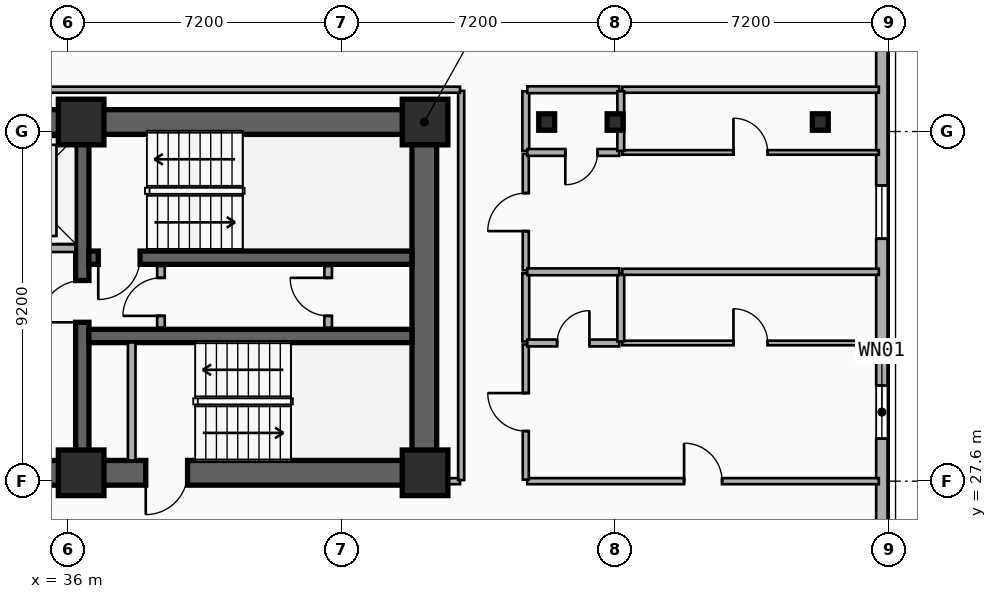
"""IFC4 building model, lengths in metres.
Left out: names, types, materials, properties, quantities, classifications, styles, units other than length and angle.
Written with IfcOpenShell. Run it as: python <this file> out.ifc"""

import sys

from ifc_helpers import new_model, si_unit, direction, frame, frame_2d, origin, origin_2d, place, context, subcontext, project, spatial, rectangle, i_section, extrude, element, fill, save


model = new_model("IFC4")
c1 = context("Model", 3, precision=1e-05, world=origin(), true_north=direction((0.0, 1.0)))
c2 = subcontext(c1, "Body", "Model", "MODEL_VIEW")
j1 = project(units=[si_unit("LENGTHUNIT", "METRE"), si_unit("PLANEANGLEUNIT", "RADIAN")], contexts=[c1])
p1 = place(None, origin())
s1 = spatial("IfcSite", under=j1, at=p1, CompositionType="ELEMENT")
p2 = place(p1, origin())
s2 = spatial("IfcBuilding", under=s1, at=p2, CompositionType="ELEMENT")
p3 = place(p2, frame((0.0, 0.0, 115.3)))
s3 = spatial("IfcBuildingStorey", under=s2, at=p3, CompositionType="ELEMENT", Elevation=115.3)
p4 = place(p3, frame((12.15, 37.05, 0.0), z_axis=(0.0, 0.0, 1.0), x_axis=(1.0, 0.0, 0.0)))
e1 = element("IfcWall", 1, at=p4, inside=s3, PredefinedType="SHEAR", context=c2, shape_type="SweptSolid", body=[
    extrude(rectangle(XDim=33.23, YDim=0.65, at=frame_2d((16.615, 0.0))), origin(), (0.0, 0.0, 1.0), 3.5),
])
p5 = place(p3, frame((45.38, 27.82, 0.0), z_axis=(0.0, 0.0, 1.0), x_axis=(-1.0, 0.0, 0.0)))
e2 = element("IfcWall", 2, at=p5, inside=s3, PredefinedType="SHEAR", context=c2, shape_type="SweptSolid", body=[
    extrude(rectangle(XDim=12.23, YDim=0.65, at=frame_2d((6.115, 0.0))), origin(), (0.0, 0.0, 1.0), 3.5),
])
p6 = place(p5, frame((9.93, 0.0, 0.0)))
e3 = element("IfcOpeningElement", 3, at=p6, cuts=e2, PredefinedType="OPENING", context=c2, shape_type="SweptSolid", body=[
    extrude(rectangle(XDim=1.1, YDim=2.15, at=frame_2d((0.55, 1.075))), frame((0.0, 0.335, 0.0), z_axis=(0.0, -1.0, 0.0), x_axis=(1.0, 0.0, 0.0)), (0.0, 0.0, 1.0), 0.67),
])
p7 = place(p5, frame((6.23, 0.0, 0.0)))
e4 = element("IfcOpeningElement", 4, at=p7, cuts=e2, PredefinedType="OPENING", context=c2, shape_type="SweptSolid", body=[
    extrude(rectangle(XDim=1.1, YDim=2.15, at=frame_2d((0.55, 1.075))), frame((0.0, 0.335, 0.0), z_axis=(0.0, -1.0, 0.0), x_axis=(1.0, 0.0, 0.0)), (0.0, 0.0, 1.0), 0.67),
])
p8 = place(p3, frame((45.38, 28.145, 0.0), z_axis=(0.0, 0.0, 1.0), x_axis=(0.0, 1.0, 0.0)))
e5 = element("IfcWall", 5, at=p8, inside=s3, PredefinedType="SHEAR", context=c2, shape_type="SweptSolid", body=[
    extrude(rectangle(XDim=8.58, YDim=0.65, at=frame_2d((4.29, 0.0))), origin(), (0.0, 0.0, 1.0), 3.5),
])
p9 = place(p3, frame((36.38, 28.145, 0.0), z_axis=(0.0, 0.0, 1.0), x_axis=(0.0, 1.0, 0.0)))
e6 = element("IfcWall", 6, at=p9, inside=s3, PredefinedType="SHEAR", context=c2, shape_type="SweptSolid", body=[
    extrude(rectangle(XDim=8.58, YDim=0.35, at=frame_2d((4.29, 0.0))), origin(), (0.0, 0.0, 1.0), 3.5),
])
p10 = place(p9, frame((3.635, 0.0, 0.0)))
e7 = element("IfcOpeningElement", 7, at=p10, cuts=e6, PredefinedType="OPENING", context=c2, shape_type="SweptSolid", body=[
    extrude(rectangle(XDim=1.1, YDim=2.15, at=frame_2d((0.55, 1.075))), frame((0.0, 0.185, 0.0), z_axis=(0.0, -1.0, 0.0), x_axis=(1.0, 0.0, 0.0)), (0.0, 0.0, 1.0), 0.37),
])
p11 = place(p3, frame((45.055, 33.48, 0.0), z_axis=(0.0, 0.0, 1.0), x_axis=(-1.0, 0.0, 0.0)))
e8 = element("IfcWall", 8, at=p11, inside=s3, PredefinedType="SHEAR", context=c2, shape_type="SweptSolid", body=[
    extrude(rectangle(XDim=8.5, YDim=0.35, at=frame_2d((4.25, 0.0))), origin(), (0.0, 0.0, 1.0), 3.5),
])
p12 = place(p11, frame((7.155, 0.0, 0.0)))
e9 = element("IfcOpeningElement", 9, at=p12, cuts=e8, PredefinedType="OPENING", context=c2, shape_type="SweptSolid", body=[
    extrude(rectangle(XDim=1.1, YDim=2.15, at=frame_2d((0.55, 1.075))), frame((0.0, 0.185, 0.0), z_axis=(0.0, -1.0, 0.0), x_axis=(1.0, 0.0, 0.0)), (0.0, 0.0, 1.0), 0.37),
])
p13 = place(p3, frame((36.555, 31.42, 0.0), z_axis=(0.0, 0.0, 1.0), x_axis=(1.0, 0.0, 0.0)))
e10 = element("IfcWall", 10, at=p13, inside=s3, PredefinedType="SHEAR", context=c2, shape_type="SweptSolid", body=[
    extrude(rectangle(XDim=8.5, YDim=0.35, at=frame_2d((4.25, 0.0))), origin(), (0.0, 0.0, 1.0), 3.5),
])
for number, where, z_axis, x_axis in (
    (11, (36.35, 27.82, 0.0), (0.0, 0.0, 1.0), (1.0, 0.0, 0.0)),
    (12, (36.35, 37.05, 0.0), (0.0, 0.0, 1.0), (1.0, 0.0, 0.0)),
    (13, (45.4, 27.82, 0.0), (0.0, 0.0, 1.0), (1.0, 0.0, 0.0)),
    (14, (45.4, 37.05, 0.0), (0.0, 0.0, 1.0), (1.0, 0.0, 0.0)),
):
    element("IfcColumn", number, at=place(p3, frame(where, z_axis=z_axis, x_axis=x_axis)), inside=s3, PredefinedType="COLUMN", context=c2, shape_type="SweptSolid", body=[
        extrude(rectangle(XDim=1.2, YDim=1.2, at=origin_2d()), origin(), (0.0, 0.0, 1.0), 3.5),
    ])
for number, where, z_axis, x_axis in (
    (15, (48.6, 37.05, 0.0), (0.0, 0.0, 1.0), (1.0, 0.0, 0.0)),
    (16, (50.4, 37.05, 0.0), (0.0, 0.0, 1.0), (1.0, 0.0, 0.0)),
    (17, (55.8, 37.05, 0.0), (0.0, 0.0, 1.0), (1.0, 0.0, 0.0)),
):
    element("IfcColumn", number, at=place(p3, frame(where, z_axis=z_axis, x_axis=x_axis)), inside=s3, PredefinedType="COLUMN", context=c2, shape_type="SweptSolid", body=[
        extrude(i_section(OverallWidth=0.418, OverallDepth=0.432, WebThickness=0.035, FlangeThickness=0.056, FilletRadius=0.015, at=origin_2d()), origin(), (0.0, 0.0, 1.0), 3.5),
    ])
p14 = place(p3, frame((57.42, 39.0, 0.0), z_axis=(0.0, 0.0, 1.0), x_axis=(0.0, -1.0, 0.0)))
e18 = element("IfcWall", 18, at=p14, inside=s3, PredefinedType="SOLIDWALL", context=c2, shape_type="SweptSolid", body=[
    extrude(rectangle(XDim=18.0, YDim=0.3, at=frame_2d((9.0, 0.0))), origin(), (0.0, 0.0, 1.0), 3.24),
])
p15 = place(p14, frame((8.882, 0.0, 0.48)))
e19 = element("IfcOpeningElement", 19, at=p15, cuts=e18, PredefinedType="OPENING", context=c2, shape_type="SweptSolid", body=[
    extrude(rectangle(XDim=1.4, YDim=1.8, at=frame_2d((0.7, 0.9))), frame((0.0, 0.16, 0.0), z_axis=(0.0, -1.0, 0.0), x_axis=(1.0, 0.0, 0.0)), (0.0, 0.0, 1.0), 0.32),
])
p16 = place(p14, frame((3.621, 0.0, 0.48)))
e20 = element("IfcOpeningElement", 20, at=p16, cuts=e18, PredefinedType="OPENING", context=c2, shape_type="SweptSolid", body=[
    extrude(rectangle(XDim=1.4, YDim=1.8, at=frame_2d((0.7, 0.9))), frame((0.0, 0.16, 0.0), z_axis=(0.0, -1.0, 0.0), x_axis=(1.0, 0.0, 0.0)), (0.0, 0.0, 1.0), 0.32),
])
p17 = place(p14, frame((16.28, 0.0, 0.65)))
e21 = element("IfcOpeningElement", 21, at=p17, cuts=e18, PredefinedType="OPENING", context=c2, shape_type="SweptSolid", body=[
    extrude(rectangle(XDim=1.4, YDim=1.8, at=frame_2d((0.7, 0.9))), frame((0.0, 0.16, 0.0), z_axis=(0.0, -1.0, 0.0), x_axis=(1.0, 0.0, 0.0)), (0.0, 0.0, 1.0), 0.32),
])
p18 = place(p3, frame((33.475, 33.73, 0.0), z_axis=(0.0, 0.0, 1.0), x_axis=(1.0, 0.0, 0.0)))
e22 = element("IfcWall", 22, at=p18, inside=s3, PredefinedType="PARTITIONING", context=c2, shape_type="SweptSolid", body=[
    extrude(rectangle(XDim=2.725, YDim=0.2, at=frame_2d((1.362, 0.0))), origin(), (0.0, 0.0, 1.0), 2.212),
])
p19 = place(p18, frame((0.812, 0.0, 0.0)))
e23 = element("IfcOpeningElement", 23, at=p19, cuts=e22, PredefinedType="OPENING", context=c2, shape_type="SweptSolid", body=[
    extrude(rectangle(XDim=1.1, YDim=2.15, at=frame_2d((0.55, 1.075))), frame((0.0, 0.11, 0.0), z_axis=(0.0, -1.0, 0.0), x_axis=(1.0, 0.0, 0.0)), (0.0, 0.0, 1.0), 0.22),
])
p20 = place(p3, frame((37.68, 28.145, 0.0), z_axis=(0.0, 0.0, 1.0), x_axis=(0.0, 1.0, 0.0)))
e24 = element("IfcWall", 24, at=p20, inside=s3, PredefinedType="PARTITIONING", context=c2, shape_type="SweptSolid", body=[
    extrude(rectangle(XDim=3.105, YDim=0.2, at=frame_2d((1.552, 0.0))), origin(), (0.0, 0.0, 1.0), 2.62),
])
p21 = place(p3, frame((38.45, 31.64, 0.0), z_axis=(0.0, 0.0, 1.0), x_axis=(0.0, 1.0, 0.0)))
e25 = element("IfcWall", 25, at=p21, inside=s3, PredefinedType="PARTITIONING", context=c2, shape_type="SweptSolid", body=[
    extrude(rectangle(XDim=1.62, YDim=0.2, at=frame_2d((0.81, 0.0))), origin(), (0.0, 0.0, 1.0), 3.24),
])
p22 = place(p21, frame((0.31, 0.0, 0.0)))
e26 = element("IfcOpeningElement", 26, at=p22, cuts=e25, PredefinedType="OPENING", context=c2, shape_type="SweptSolid", body=[
    extrude(rectangle(XDim=1.0, YDim=2.15, at=frame_2d((0.5, 1.075))), frame((0.0, 0.11, 0.0), z_axis=(0.0, -1.0, 0.0), x_axis=(1.0, 0.0, 0.0)), (0.0, 0.0, 1.0), 0.22),
])
p23 = place(p3, frame((42.85, 31.64, 0.0), z_axis=(0.0, 0.0, 1.0), x_axis=(0.0, 1.0, 0.0)))
e27 = element("IfcWall", 27, at=p23, inside=s3, PredefinedType="PARTITIONING", context=c2, shape_type="SweptSolid", body=[
    extrude(rectangle(XDim=1.62, YDim=0.2, at=frame_2d((0.81, 0.0))), origin(), (0.0, 0.0, 1.0), 3.24),
])
p24 = place(p23, frame((0.31, 0.0, 0.0)))
e28 = element("IfcOpeningElement", 28, at=p24, cuts=e27, PredefinedType="OPENING", context=c2, shape_type="SweptSolid", body=[
    extrude(rectangle(XDim=1.0, YDim=2.15, at=frame_2d((0.5, 1.075))), frame((0.0, 0.11, 0.0), z_axis=(0.0, -1.0, 0.0), x_axis=(1.0, 0.0, 0.0)), (0.0, 0.0, 1.0), 0.22),
])
p25 = place(p3, frame((48.09, 27.6, 0.0), z_axis=(0.0, 0.0, 1.0), x_axis=(1.0, 0.0, 0.0)))
e29 = element("IfcWall", 29, at=p25, inside=s3, PredefinedType="PARTITIONING", context=c2, shape_type="SweptSolid", body=[
    extrude(rectangle(XDim=9.25, YDim=0.16, at=frame_2d((4.625, 0.0))), origin(), (0.0, 0.0, 1.0), 2.57),
])
p26 = place(p25, frame((4.125, 0.0, 0.0)))
e30 = element("IfcOpeningElement", 30, at=p26, cuts=e29, PredefinedType="OPENING", context=c2, shape_type="SweptSolid", body=[
    extrude(rectangle(XDim=1.0, YDim=2.15, at=frame_2d((0.5, 1.075))), frame((0.0, 0.09, 0.0), z_axis=(0.0, -1.0, 0.0), x_axis=(1.0, 0.0, 0.0)), (0.0, 0.0, 1.0), 0.18),
])
p27 = place(p3, frame((48.05, 27.64, 0.0), z_axis=(0.0, 0.0, 1.0), x_axis=(0.0, 1.0, 0.0)))
e31 = element("IfcWall", 31, at=p27, inside=s3, PredefinedType="PARTITIONING", context=c2, shape_type="SweptSolid", body=[
    extrude(rectangle(XDim=3.556, YDim=0.16, at=frame_2d((1.778, 0.0))), origin(), (0.0, 0.0, 1.0), 3.24),
])
p28 = place(p27, frame((1.278, 0.0, 0.0)))
e32 = element("IfcOpeningElement", 32, at=p28, cuts=e31, PredefinedType="OPENING", context=c2, shape_type="SweptSolid", body=[
    extrude(rectangle(XDim=1.0, YDim=2.15, at=frame_2d((0.5, 1.075))), frame((0.0, 0.09, 0.0), z_axis=(0.0, -1.0, 0.0), x_axis=(1.0, 0.0, 0.0)), (0.0, 0.0, 1.0), 0.18),
])
p29 = place(p3, frame((48.05, 31.276, 0.0), z_axis=(0.0, 0.0, 1.0), x_axis=(0.0, 1.0, 0.0)))
e33 = element("IfcWall", 33, at=p29, inside=s3, PredefinedType="PLUMBINGWALL", context=c2, shape_type="SweptSolid", body=[
    extrude(rectangle(XDim=1.793, YDim=0.18, at=frame_2d((0.896, 0.0))), origin(), (0.0, 0.0, 1.0), 3.24),
])
p30 = place(p3, frame((48.05, 33.149, 0.0), z_axis=(0.0, 0.0, 1.0), x_axis=(0.0, 1.0, 0.0)))
e34 = element("IfcWall", 34, at=p30, inside=s3, PredefinedType="PARTITIONING", context=c2, shape_type="SweptSolid", body=[
    extrude(rectangle(XDim=3.061, YDim=0.16, at=frame_2d((1.531, 0.0))), origin(), (0.0, 0.0, 1.0), 3.24),
])
p31 = place(p30, frame((1.031, 0.0, 0.0)))
e35 = element("IfcOpeningElement", 35, at=p31, cuts=e34, PredefinedType="OPENING", context=c2, shape_type="SweptSolid", body=[
    extrude(rectangle(XDim=1.0, YDim=2.15, at=frame_2d((0.5, 1.075))), frame((0.0, 0.09, 0.0), z_axis=(0.0, -1.0, 0.0), x_axis=(1.0, 0.0, 0.0)), (0.0, 0.0, 1.0), 0.18),
])
p32 = place(p3, frame((48.05, 36.29, 0.0), z_axis=(0.0, 0.0, 1.0), x_axis=(0.0, 1.0, 0.0)))
e36 = element("IfcWall", 36, at=p32, inside=s3, PredefinedType="PLUMBINGWALL", context=c2, shape_type="SweptSolid", body=[
    extrude(rectangle(XDim=1.57, YDim=0.18, at=frame_2d((0.785, 0.0))), origin(), (0.0, 0.0, 1.0), 2.72),
])
p33 = place(p3, frame((48.09, 37.9, 0.0), z_axis=(0.0, 0.0, 1.0), x_axis=(1.0, 0.0, 0.0)))
e37 = element("IfcWall", 37, at=p33, inside=s3, PredefinedType="PLUMBINGWALL", context=c2, shape_type="SweptSolid", body=[
    extrude(rectangle(XDim=2.42, YDim=0.18, at=frame_2d((1.21, 0.0))), origin(), (0.0, 0.0, 1.0), 3.24),
])
p34 = place(p3, frame((50.59, 37.9, 0.0), z_axis=(0.0, 0.0, 1.0), x_axis=(1.0, 0.0, 0.0)))
e38 = element("IfcWall", 38, at=p34, inside=s3, PredefinedType="PARTITIONING", context=c2, shape_type="SweptSolid", body=[
    extrude(rectangle(XDim=6.75, YDim=0.16, at=frame_2d((3.375, 0.0))), origin(), (0.0, 0.0, 1.0), 3.24),
])
p35 = place(p3, frame((48.09, 31.236, 0.0), z_axis=(0.0, 0.0, 1.0), x_axis=(1.0, 0.0, 0.0)))
e39 = element("IfcWall", 39, at=p35, inside=s3, PredefinedType="PLUMBINGWALL", context=c2, shape_type="SweptSolid", body=[
    extrude(rectangle(XDim=2.42, YDim=0.18, at=frame_2d((1.21, 0.0))), origin(), (0.0, 0.0, 1.0), 2.57),
])
p36 = place(p35, frame((0.785, 0.0, 0.0)))
e40 = element("IfcOpeningElement", 40, at=p36, cuts=e39, PredefinedType="OPENING", context=c2, shape_type="SweptSolid", body=[
    extrude(rectangle(XDim=0.85, YDim=2.1, at=frame_2d((0.425, 1.05))), frame((0.0, 0.1, 0.0), z_axis=(0.0, -1.0, 0.0), x_axis=(1.0, 0.0, 0.0)), (0.0, 0.0, 1.0), 0.2),
])
p37 = place(p3, frame((50.59, 31.236, 0.0), z_axis=(0.0, 0.0, 1.0), x_axis=(1.0, 0.0, 0.0)))
e41 = element("IfcWall", 41, at=p37, inside=s3, PredefinedType="PARTITIONING", context=c2, shape_type="SweptSolid", body=[
    extrude(rectangle(XDim=6.75, YDim=0.12, at=frame_2d((3.375, 0.0))), origin(), (0.0, 0.0, 1.0), 2.57),
])
p38 = place(p37, frame((2.925, 0.0, 0.0)))
e42 = element("IfcOpeningElement", 42, at=p38, cuts=e41, PredefinedType="OPENING", context=c2, shape_type="SweptSolid", body=[
    extrude(rectangle(XDim=0.9, YDim=2.1, at=frame_2d((0.45, 1.05))), frame((0.0, 0.07, 0.0), z_axis=(0.0, -1.0, 0.0), x_axis=(1.0, 0.0, 0.0)), (0.0, 0.0, 1.0), 0.14),
])
p39 = place(p3, frame((50.55, 31.276, 0.0), z_axis=(0.0, 0.0, 1.0), x_axis=(0.0, 1.0, 0.0)))
e43 = element("IfcWall", 43, at=p39, inside=s3, PredefinedType="PLUMBINGWALL", context=c2, shape_type="SweptSolid", body=[
    extrude(rectangle(XDim=1.793, YDim=0.18, at=frame_2d((0.896, 0.0))), origin(), (0.0, 0.0, 1.0), 2.57),
])
p40 = place(p3, frame((48.09, 33.109, 0.0), z_axis=(0.0, 0.0, 1.0), x_axis=(1.0, 0.0, 0.0)))
e44 = element("IfcWall", 44, at=p40, inside=s3, PredefinedType="PLUMBINGWALL", context=c2, shape_type="SweptSolid", body=[
    extrude(rectangle(XDim=2.42, YDim=0.18, at=frame_2d((1.21, 0.0))), origin(), (0.0, 0.0, 1.0), 2.57),
])
p41 = place(p3, frame((50.59, 33.109, 0.0), z_axis=(0.0, 0.0, 1.0), x_axis=(1.0, 0.0, 0.0)))
e45 = element("IfcWall", 45, at=p41, inside=s3, PredefinedType="PARTITIONING", context=c2, shape_type="SweptSolid", body=[
    extrude(rectangle(XDim=6.75, YDim=0.16, at=frame_2d((3.375, 0.0))), origin(), (0.0, 0.0, 1.0), 2.57),
])
p42 = place(p3, frame((50.51, 36.25, 0.0), z_axis=(0.0, 0.0, 1.0), x_axis=(-1.0, 0.0, 0.0)))
e46 = element("IfcWall", 46, at=p42, inside=s3, PredefinedType="PLUMBINGWALL", context=c2, shape_type="SweptSolid", body=[
    extrude(rectangle(XDim=2.42, YDim=0.18, at=frame_2d((1.21, 0.0))), origin(), (0.0, 0.0, 1.0), 2.57),
])
p43 = place(p42, frame((0.57, 0.0, 0.0)))
e47 = element("IfcOpeningElement", 47, at=p43, cuts=e46, PredefinedType="OPENING", context=c2, shape_type="SweptSolid", body=[
    extrude(rectangle(XDim=0.85, YDim=2.1, at=frame_2d((0.425, 1.05))), frame((0.0, 0.1, 0.0), z_axis=(0.0, -1.0, 0.0), x_axis=(1.0, 0.0, 0.0)), (0.0, 0.0, 1.0), 0.2),
])
p44 = place(p3, frame((50.59, 36.25, 0.0), z_axis=(0.0, 0.0, 1.0), x_axis=(1.0, 0.0, 0.0)))
e48 = element("IfcWall", 48, at=p44, inside=s3, PredefinedType="PARTITIONING", context=c2, shape_type="SweptSolid", body=[
    extrude(rectangle(XDim=6.75, YDim=0.12, at=frame_2d((3.375, 0.0))), origin(), (0.0, 0.0, 1.0), 2.57),
])
p45 = place(p44, frame((2.925, 0.0, 0.0)))
e49 = element("IfcOpeningElement", 49, at=p45, cuts=e48, PredefinedType="OPENING", context=c2, shape_type="SweptSolid", body=[
    extrude(rectangle(XDim=0.9, YDim=2.1, at=frame_2d((0.45, 1.05))), frame((0.0, 0.07, 0.0), z_axis=(0.0, -1.0, 0.0), x_axis=(1.0, 0.0, 0.0)), (0.0, 0.0, 1.0), 0.14),
])
p46 = place(p3, frame((50.55, 36.29, 0.0), z_axis=(0.0, 0.0, 1.0), x_axis=(0.0, 1.0, 0.0)))
e50 = element("IfcWall", 50, at=p46, inside=s3, PredefinedType="PLUMBINGWALL", context=c2, shape_type="SweptSolid", body=[
    extrude(rectangle(XDim=1.57, YDim=0.18, at=frame_2d((0.785, 0.0))), origin(), (0.0, 0.0, 1.0), 2.57),
])
p47 = place(p3, frame((45.41, 27.6, 0.0), z_axis=(0.0, 0.0, 1.0), x_axis=(1.0, 0.0, 0.0)))
e51 = element("IfcWall", 51, at=p47, inside=s3, PredefinedType="PARTITIONING", context=c2, shape_type="SweptSolid", body=[
    extrude(rectangle(XDim=0.91, YDim=0.16, at=frame_2d((0.455, 0.0))), origin(), (0.0, 0.0, 1.0), 2.28),
])
p48 = place(p3, frame((46.35, 27.63, 0.0), z_axis=(0.0, 0.0, 1.0), x_axis=(0.0, 1.0, 0.0)))
e52 = element("IfcWall", 52, at=p48, inside=s3, PredefinedType="PARTITIONING", context=c2, shape_type="SweptSolid", body=[
    extrude(rectangle(XDim=10.24, YDim=0.16, at=frame_2d((5.12, 0.0))), origin(), (0.0, 0.0, 1.0), 2.72),
])
p49 = place(p3, frame((11.28, 37.9, 0.0), z_axis=(0.0, 0.0, 1.0), x_axis=(1.0, 0.0, 0.0)))
e53 = element("IfcWall", 53, at=p49, inside=s3, PredefinedType="PARTITIONING", context=c2, shape_type="SweptSolid", body=[
    extrude(rectangle(XDim=35.04, YDim=0.16, at=frame_2d((17.52, 0.0))), origin(), (0.0, 0.0, 1.0), 3.24),
])
p50 = place(p15, origin())
e54 = element("IfcWindow", 54, at=p50, inside=s3, PartitioningType="SINGLE_PANEL", PredefinedType="WINDOW", context=c2, shape_type="SweptSolid", body=[
    extrude(rectangle(XDim=1.4, YDim=1.8, at=frame_2d((0.7, 0.9))), frame((0.0, 0.03, 0.0), z_axis=(0.0, -1.0, 0.0), x_axis=(1.0, 0.0, 0.0)), (0.0, 0.0, 1.0), 0.06),
])
fill(e19, e54)
p51 = place(p16, origin())
e55 = element("IfcWindow", 55, at=p51, inside=s3, PartitioningType="SINGLE_PANEL", PredefinedType="WINDOW", context=c2, shape_type="SweptSolid", body=[
    extrude(rectangle(XDim=1.4, YDim=1.8, at=frame_2d((0.7, 0.9))), frame((0.0, 0.03, 0.0), z_axis=(0.0, -1.0, 0.0), x_axis=(1.0, 0.0, 0.0)), (0.0, 0.0, 1.0), 0.06),
])
fill(e20, e55)
p52 = place(p12, origin())
e56 = element("IfcDoor", 56, at=p52, inside=s3, OperationType="SINGLE_SWING_RIGHT", PredefinedType="DOOR", context=c2, shape_type="SweptSolid", body=[
    extrude(rectangle(XDim=1.1, YDim=2.15, at=frame_2d((0.55, 1.075))), frame((0.0, 0.025, 0.0), z_axis=(0.0, -1.0, 0.0), x_axis=(1.0, 0.0, 0.0)), (0.0, 0.0, 1.0), 0.05),
])
fill(e9, e56)
p53 = place(p10, origin())
e57 = element("IfcDoor", 57, at=p53, inside=s3, OperationType="SINGLE_SWING_LEFT", PredefinedType="DOOR", context=c2, shape_type="SweptSolid", body=[
    extrude(rectangle(XDim=1.1, YDim=2.15, at=frame_2d((0.55, 1.075))), frame((0.0, 0.025, 0.0), z_axis=(0.0, -1.0, 0.0), x_axis=(1.0, 0.0, 0.0)), (0.0, 0.0, 1.0), 0.05),
])
fill(e7, e57)
p54 = place(p7, origin())
e58 = element("IfcDoor", 58, at=p54, inside=s3, OperationType="SINGLE_SWING_RIGHT", PredefinedType="DOOR", context=c2, shape_type="SweptSolid", body=[
    extrude(rectangle(XDim=1.1, YDim=2.15, at=frame_2d((0.55, 1.075))), frame((0.0, 0.025, 0.0), z_axis=(0.0, -1.0, 0.0), x_axis=(1.0, 0.0, 0.0)), (0.0, 0.0, 1.0), 0.05),
])
fill(e4, e58)
p55 = place(p22, origin())
e59 = element("IfcDoor", 59, at=p55, inside=s3, OperationType="SINGLE_SWING_LEFT", PredefinedType="DOOR", context=c2, shape_type="SweptSolid", body=[
    extrude(rectangle(XDim=1.0, YDim=2.15, at=frame_2d((0.5, 1.075))), frame((0.0, 0.025, 0.0), z_axis=(0.0, -1.0, 0.0), x_axis=(1.0, 0.0, 0.0)), (0.0, 0.0, 1.0), 0.05),
])
fill(e26, e59)
p56 = place(p24, origin())
e60 = element("IfcDoor", 60, at=p56, inside=s3, OperationType="SINGLE_SWING_RIGHT", PredefinedType="DOOR", context=c2, shape_type="SweptSolid", body=[
    extrude(rectangle(XDim=1.0, YDim=2.15, at=frame_2d((0.5, 1.075))), frame((0.0, 0.025, 0.0), z_axis=(0.0, -1.0, 0.0), x_axis=(1.0, 0.0, 0.0)), (0.0, 0.0, 1.0), 0.05),
])
fill(e28, e60)
p57 = place(p26, origin())
e61 = element("IfcDoor", 61, at=p57, inside=s3, OperationType="SINGLE_SWING_LEFT", PredefinedType="DOOR", context=c2, shape_type="SweptSolid", body=[
    extrude(rectangle(XDim=1.0, YDim=2.15, at=frame_2d((0.5, 1.075))), frame((0.0, 0.025, 0.0), z_axis=(0.0, -1.0, 0.0), x_axis=(1.0, 0.0, 0.0)), (0.0, 0.0, 1.0), 0.05),
])
fill(e30, e61)
p58 = place(p28, origin())
e62 = element("IfcDoor", 62, at=p58, inside=s3, OperationType="SINGLE_SWING_RIGHT", PredefinedType="DOOR", context=c2, shape_type="SweptSolid", body=[
    extrude(rectangle(XDim=1.0, YDim=2.15, at=frame_2d((0.5, 1.075))), frame((0.0, 0.025, 0.0), z_axis=(0.0, -1.0, 0.0), x_axis=(1.0, 0.0, 0.0)), (0.0, 0.0, 1.0), 0.05),
])
fill(e32, e62)
p59 = place(p31, origin())
e63 = element("IfcDoor", 63, at=p59, inside=s3, OperationType="SINGLE_SWING_LEFT", PredefinedType="DOOR", context=c2, shape_type="SweptSolid", body=[
    extrude(rectangle(XDim=1.0, YDim=2.15, at=frame_2d((0.5, 1.075))), frame((0.0, 0.025, 0.0), z_axis=(0.0, -1.0, 0.0), x_axis=(1.0, 0.0, 0.0)), (0.0, 0.0, 1.0), 0.05),
])
fill(e35, e63)
p60 = place(p36, origin())
e64 = element("IfcDoor", 64, at=p60, inside=s3, OperationType="SINGLE_SWING_RIGHT", PredefinedType="DOOR", context=c2, shape_type="SweptSolid", body=[
    extrude(rectangle(XDim=0.85, YDim=2.1, at=frame_2d((0.425, 1.05))), frame((0.0, 0.025, 0.0), z_axis=(0.0, -1.0, 0.0), x_axis=(1.0, 0.0, 0.0)), (0.0, 0.0, 1.0), 0.05),
])
fill(e40, e64)
p61 = place(p38, origin())
e65 = element("IfcDoor", 65, at=p61, inside=s3, OperationType="SINGLE_SWING_LEFT", PredefinedType="DOOR", context=c2, shape_type="SweptSolid", body=[
    extrude(rectangle(XDim=0.9, YDim=2.1, at=frame_2d((0.45, 1.05))), frame((0.0, 0.025, 0.0), z_axis=(0.0, -1.0, 0.0), x_axis=(1.0, 0.0, 0.0)), (0.0, 0.0, 1.0), 0.05),
])
fill(e42, e65)
p62 = place(p43, origin())
e66 = element("IfcDoor", 66, at=p62, inside=s3, OperationType="SINGLE_SWING_RIGHT", PredefinedType="DOOR", context=c2, shape_type="SweptSolid", body=[
    extrude(rectangle(XDim=0.85, YDim=2.1, at=frame_2d((0.425, 1.05))), frame((0.0, 0.025, 0.0), z_axis=(0.0, -1.0, 0.0), x_axis=(1.0, 0.0, 0.0)), (0.0, 0.0, 1.0), 0.05),
])
fill(e47, e66)
p63 = place(p45, origin())
e67 = element("IfcDoor", 67, at=p63, inside=s3, OperationType="SINGLE_SWING_LEFT", PredefinedType="DOOR", context=c2, shape_type="SweptSolid", body=[
    extrude(rectangle(XDim=0.9, YDim=2.1, at=frame_2d((0.45, 1.05))), frame((0.0, 0.025, 0.0), z_axis=(0.0, -1.0, 0.0), x_axis=(1.0, 0.0, 0.0)), (0.0, 0.0, 1.0), 0.05),
])
fill(e49, e67)
save(model, sys.argv[1])
